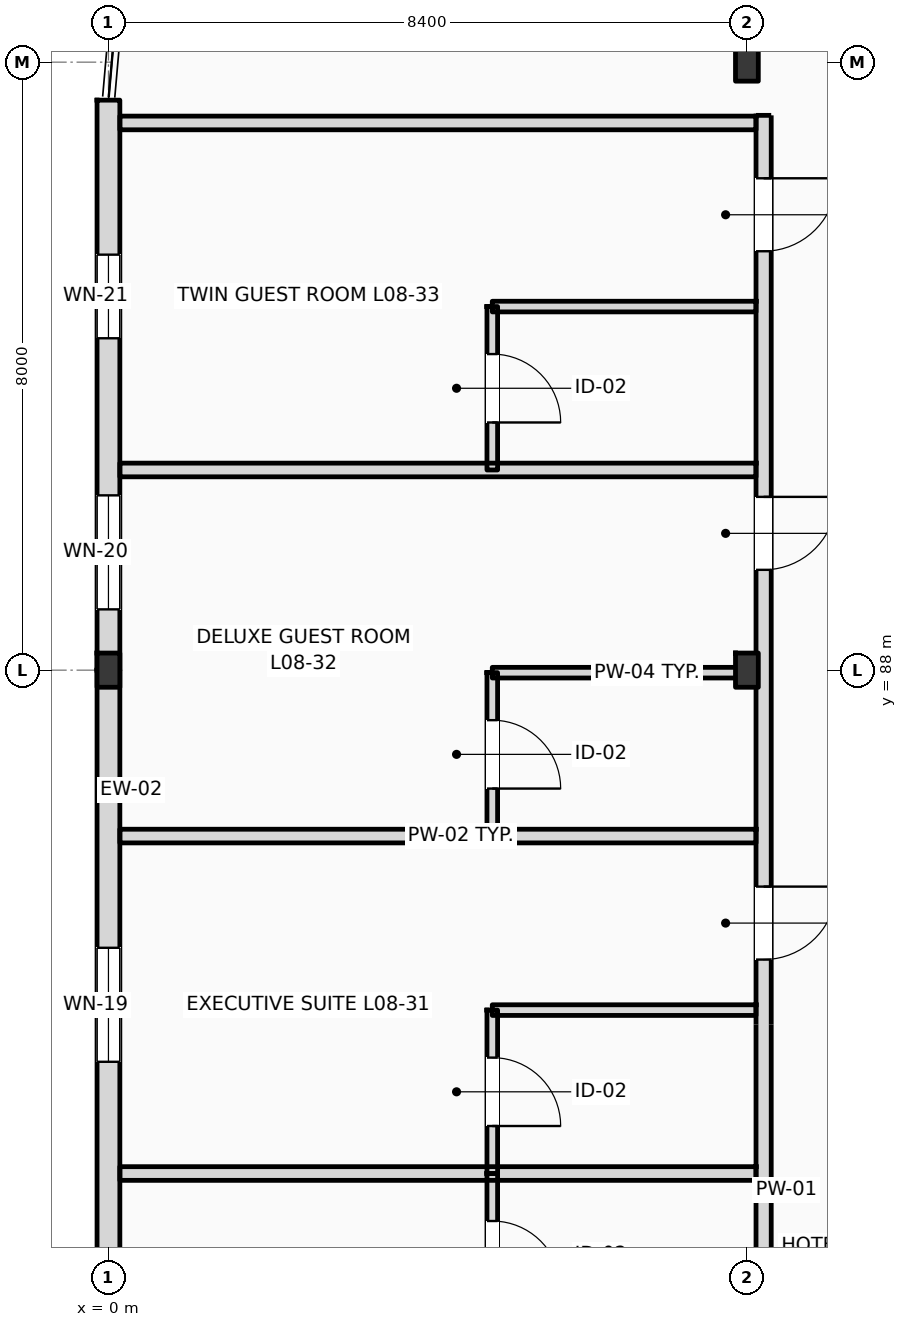
"""IFC4 building model, lengths in metres.
Left out: names, types, materials, properties, quantities, classifications, styles, units other than length and angle.
Written with IfcOpenShell. Run it as: python <this file> out.ifc"""

import sys

from ifc_helpers import new_model, si_unit, direction, frame, frame_2d, origin, origin_2d, place, context, subcontext, project, spatial, rectangle, i_section, extrude, element, fill, save


model = new_model("IFC4")
c1 = context("Model", 3, precision=1e-05, world=origin(), true_north=direction((0.0, 1.0)))
c2 = subcontext(c1, "Body", "Model", "MODEL_VIEW")
j1 = project(units=[si_unit("LENGTHUNIT", "METRE"), si_unit("PLANEANGLEUNIT", "RADIAN")], contexts=[c1])
p1 = place(None, origin())
s1 = spatial("IfcSite", under=j1, at=p1, CompositionType="ELEMENT")
p2 = place(p1, origin())
s2 = spatial("IfcBuilding", under=s1, at=p2, CompositionType="ELEMENT")
p3 = place(p2, frame((0.0, 0.0, 35.4)))
s3 = spatial("IfcBuildingStorey", under=s2, at=p3, CompositionType="ELEMENT", Elevation=35.4)
for number, where, z_axis, x_axis in (
    (1, (0.0, 88.0, 0.0), (0.0, 0.0, 1.0), (1.0, 0.0, 0.0)),
    (2, (8.4, 88.0, 0.0), (0.0, 0.0, 1.0), (1.0, 0.0, 0.0)),
):
    element("IfcColumn", number, at=place(p3, frame(where, z_axis=z_axis, x_axis=x_axis)), inside=s3, PredefinedType="COLUMN", context=c2, shape_type="SweptSolid", body=[
        extrude(i_section(OverallWidth=0.3, OverallDepth=0.45, WebThickness=0.014, FlangeThickness=0.026, FilletRadius=0.027, at=origin_2d()), origin(), (0.0, 0.0, 1.0), 3.6),
    ])
p4 = place(p3, frame((8.4, 96.0, 0.0), z_axis=(0.0, 0.0, 1.0), x_axis=(1.0, 0.0, 0.0)))
e3 = element("IfcColumn", 3, at=p4, inside=s3, PredefinedType="COLUMN", context=c2, shape_type="SweptSolid", body=[
    extrude(i_section(OverallWidth=0.3, OverallDepth=0.5, WebThickness=0.014, FlangeThickness=0.028, FilletRadius=0.027, at=origin_2d()), origin(), (0.0, 0.0, 1.0), 3.6),
])
p5 = place(p3, frame((0.0, 79.5, 0.0), z_axis=(0.0, 0.0, 1.0), x_axis=(0.0, 1.0, 0.0)))
e4 = element("IfcWall", 4, at=p5, inside=s3, PredefinedType="STANDARD", context=c2, shape_type="SweptSolid", body=[
    extrude(rectangle(XDim=8.5, YDim=0.3, at=frame_2d((4.25, 0.0))), origin(), (0.0, 0.0, 1.0), 3.01),
])
p6 = place(p5, frame((3.347, 0.0, 0.9)))
e5 = element("IfcOpeningElement", 5, at=p6, cuts=e4, PredefinedType="OPENING", context=c2, shape_type="SweptSolid", body=[
    extrude(rectangle(XDim=1.5, YDim=1.93, at=frame_2d((0.75, 0.965))), frame((0.0, 0.16, 0.0), z_axis=(0.0, -1.0, 0.0), x_axis=(1.0, 0.0, 0.0)), (0.0, 0.0, 1.0), 0.32),
])
p7 = place(p3, frame((0.0, 88.0, 0.0), z_axis=(0.0, 0.0, 1.0), x_axis=(0.0, 1.0, 0.0)))
e6 = element("IfcWall", 6, at=p7, inside=s3, PredefinedType="STANDARD", context=c2, shape_type="SweptSolid", body=[
    extrude(rectangle(XDim=7.5, YDim=0.3, at=frame_2d((3.75, 0.0))), origin(), (0.0, 0.0, 1.0), 3.38),
])
p8 = place(p7, frame((0.8, 0.0, 0.9)))
e7 = element("IfcOpeningElement", 7, at=p8, cuts=e6, PredefinedType="OPENING", context=c2, shape_type="SweptSolid", body=[
    extrude(rectangle(XDim=1.5, YDim=2.3, at=frame_2d((0.75, 1.15))), frame((0.0, 0.16, 0.0), z_axis=(0.0, -1.0, 0.0), x_axis=(1.0, 0.0, 0.0)), (0.0, 0.0, 1.0), 0.32),
])
p9 = place(p7, frame((4.367, 0.0, 0.9)))
e8 = element("IfcOpeningElement", 8, at=p9, cuts=e6, PredefinedType="OPENING", context=c2, shape_type="SweptSolid", body=[
    extrude(rectangle(XDim=1.1, YDim=1.5, at=frame_2d((0.55, 0.75))), frame((0.0, 0.16, 0.0), z_axis=(0.0, -1.0, 0.0), x_axis=(1.0, 0.0, 0.0)), (0.0, 0.0, 1.0), 0.32),
])
p10 = place(p3, frame((8.62, 62.64, 0.0), z_axis=(0.0, 0.0, 1.0), x_axis=(0.0, 1.0, 0.0)))
e9 = element("IfcWall", 9, at=p10, inside=s3, PredefinedType="PARTITIONING", context=c2, shape_type="SweptSolid", body=[
    extrude(rectangle(XDim=32.66, YDim=0.2, at=frame_2d((16.33, 0.0))), origin(), (0.0, 0.0, 1.0), 3.01),
])
p11 = place(p10, frame((3.006, 0.0, 0.0)))
e10 = element("IfcOpeningElement", 10, at=p11, cuts=e9, PredefinedType="OPENING", context=c2, shape_type="SweptSolid", body=[
    extrude(rectangle(XDim=0.96, YDim=2.2, at=frame_2d((0.48, 1.1))), frame((0.0, 0.11, 0.0), z_axis=(0.0, -1.0, 0.0), x_axis=(1.0, 0.0, 0.0)), (0.0, 0.0, 1.0), 0.22),
])
p12 = place(p10, frame((5.516, 0.0, 0.0)))
e11 = element("IfcOpeningElement", 11, at=p12, cuts=e9, PredefinedType="OPENING", context=c2, shape_type="SweptSolid", body=[
    extrude(rectangle(XDim=0.96, YDim=2.2, at=frame_2d((0.48, 1.1))), frame((0.0, 0.11, 0.0), z_axis=(0.0, -1.0, 0.0), x_axis=(1.0, 0.0, 0.0)), (0.0, 0.0, 1.0), 0.22),
])
p13 = place(p10, frame((12.295, 0.0, 0.0)))
e12 = element("IfcOpeningElement", 12, at=p13, cuts=e9, PredefinedType="OPENING", context=c2, shape_type="SweptSolid", body=[
    extrude(rectangle(XDim=0.96, YDim=2.2, at=frame_2d((0.48, 1.1))), frame((0.0, 0.11, 0.0), z_axis=(0.0, -1.0, 0.0), x_axis=(1.0, 0.0, 0.0)), (0.0, 0.0, 1.0), 0.22),
])
p14 = place(p10, frame((14.524, 0.0, 0.0)))
e13 = element("IfcOpeningElement", 13, at=p14, cuts=e9, PredefinedType="OPENING", context=c2, shape_type="SweptSolid", body=[
    extrude(rectangle(XDim=0.96, YDim=2.2, at=frame_2d((0.48, 1.1))), frame((0.0, 0.11, 0.0), z_axis=(0.0, -1.0, 0.0), x_axis=(1.0, 0.0, 0.0)), (0.0, 0.0, 1.0), 0.22),
])
p15 = place(p10, frame((21.552, 0.0, 0.0)))
e14 = element("IfcOpeningElement", 14, at=p15, cuts=e9, PredefinedType="OPENING", context=c2, shape_type="SweptSolid", body=[
    extrude(rectangle(XDim=0.96, YDim=2.2, at=frame_2d((0.48, 1.1))), frame((0.0, 0.11, 0.0), z_axis=(0.0, -1.0, 0.0), x_axis=(1.0, 0.0, 0.0)), (0.0, 0.0, 1.0), 0.22),
])
p16 = place(p10, frame((26.68, 0.0, 0.0)))
e15 = element("IfcOpeningElement", 15, at=p16, cuts=e9, PredefinedType="OPENING", context=c2, shape_type="SweptSolid", body=[
    extrude(rectangle(XDim=0.96, YDim=2.2, at=frame_2d((0.48, 1.1))), frame((0.0, 0.11, 0.0), z_axis=(0.0, -1.0, 0.0), x_axis=(1.0, 0.0, 0.0)), (0.0, 0.0, 1.0), 0.22),
])
p17 = place(p10, frame((30.872, 0.0, 0.0)))
e16 = element("IfcOpeningElement", 16, at=p17, cuts=e9, PredefinedType="OPENING", context=c2, shape_type="SweptSolid", body=[
    extrude(rectangle(XDim=0.96, YDim=2.2, at=frame_2d((0.48, 1.1))), frame((0.0, 0.11, 0.0), z_axis=(0.0, -1.0, 0.0), x_axis=(1.0, 0.0, 0.0)), (0.0, 0.0, 1.0), 0.22),
])
p18 = place(p3, frame((0.15, 81.377, 0.0), z_axis=(0.0, 0.0, 1.0), x_axis=(1.0, 0.0, 0.0)))
e17 = element("IfcWall", 17, at=p18, inside=s3, PredefinedType="PARTITIONING", context=c2, shape_type="SweptSolid", body=[
    extrude(rectangle(XDim=8.37, YDim=0.18, at=frame_2d((4.185, 0.0))), origin(), (0.0, 0.0, 1.0), 3.38),
])
p19 = place(p3, frame((5.05, 79.227, 0.0), z_axis=(0.0, 0.0, 1.0), x_axis=(0.0, 1.0, 0.0)))
e18 = element("IfcWall", 18, at=p19, inside=s3, PredefinedType="PARTITIONING", context=c2, shape_type="SweptSolid", body=[
    extrude(rectangle(XDim=2.15, YDim=0.14, at=frame_2d((1.075, 0.0))), origin(), (0.0, 0.0, 1.0), 3.38),
])
p20 = place(p19, frame((0.625, 0.0, 0.0)))
e19 = element("IfcOpeningElement", 19, at=p20, cuts=e18, PredefinedType="OPENING", context=c2, shape_type="SweptSolid", body=[
    extrude(rectangle(XDim=0.9, YDim=2.1, at=frame_2d((0.45, 1.05))), frame((0.0, 0.08, 0.0), z_axis=(0.0, -1.0, 0.0), x_axis=(1.0, 0.0, 0.0)), (0.0, 0.0, 1.0), 0.16),
])
p21 = place(p3, frame((0.15, 85.817, 0.0), z_axis=(0.0, 0.0, 1.0), x_axis=(1.0, 0.0, 0.0)))
e20 = element("IfcWall", 20, at=p21, inside=s3, PredefinedType="PARTITIONING", context=c2, shape_type="SweptSolid", body=[
    extrude(rectangle(XDim=8.37, YDim=0.18, at=frame_2d((4.185, 0.0))), origin(), (0.0, 0.0, 1.0), 3.38),
])
p22 = place(p3, frame((5.05, 83.527, 0.0), z_axis=(0.0, 0.0, 1.0), x_axis=(1.0, 0.0, 0.0)))
e21 = element("IfcWall", 21, at=p22, inside=s3, PredefinedType="PARTITIONING", context=c2, shape_type="SweptSolid", body=[
    extrude(rectangle(XDim=3.47, YDim=0.14, at=frame_2d((1.735, 0.0))), origin(), (0.0, 0.0, 1.0), 3.38),
])
p23 = place(p3, frame((5.05, 81.377, 0.0), z_axis=(0.0, 0.0, 1.0), x_axis=(0.0, 1.0, 0.0)))
e22 = element("IfcWall", 22, at=p23, inside=s3, PredefinedType="PARTITIONING", context=c2, shape_type="SweptSolid", body=[
    extrude(rectangle(XDim=2.15, YDim=0.14, at=frame_2d((1.075, 0.0))), origin(), (0.0, 0.0, 1.0), 3.38),
])
p24 = place(p23, frame((0.625, 0.0, 0.0)))
e23 = element("IfcOpeningElement", 23, at=p24, cuts=e22, PredefinedType="OPENING", context=c2, shape_type="SweptSolid", body=[
    extrude(rectangle(XDim=0.9, YDim=2.1, at=frame_2d((0.45, 1.05))), frame((0.0, 0.08, 0.0), z_axis=(0.0, -1.0, 0.0), x_axis=(1.0, 0.0, 0.0)), (0.0, 0.0, 1.0), 0.16),
])
p25 = place(p3, frame((0.15, 90.634, 0.0), z_axis=(0.0, 0.0, 1.0), x_axis=(1.0, 0.0, 0.0)))
e24 = element("IfcWall", 24, at=p25, inside=s3, PredefinedType="PARTITIONING", context=c2, shape_type="SweptSolid", body=[
    extrude(rectangle(XDim=8.37, YDim=0.18, at=frame_2d((4.185, 0.0))), origin(), (0.0, 0.0, 1.0), 3.38),
])
p26 = place(p3, frame((5.05, 87.967, 0.0), z_axis=(0.0, 0.0, 1.0), x_axis=(1.0, 0.0, 0.0)))
e25 = element("IfcWall", 25, at=p26, inside=s3, PredefinedType="PARTITIONING", context=c2, shape_type="SweptSolid", body=[
    extrude(rectangle(XDim=3.47, YDim=0.14, at=frame_2d((1.735, 0.0))), origin(), (0.0, 0.0, 1.0), 2.82),
])
p27 = place(p3, frame((5.05, 85.817, 0.0), z_axis=(0.0, 0.0, 1.0), x_axis=(0.0, 1.0, 0.0)))
e26 = element("IfcWall", 26, at=p27, inside=s3, PredefinedType="PARTITIONING", context=c2, shape_type="SweptSolid", body=[
    extrude(rectangle(XDim=2.15, YDim=0.14, at=frame_2d((1.075, 0.0))), origin(), (0.0, 0.0, 1.0), 3.38),
])
p28 = place(p27, frame((0.625, 0.0, 0.0)))
e27 = element("IfcOpeningElement", 27, at=p28, cuts=e26, PredefinedType="OPENING", context=c2, shape_type="SweptSolid", body=[
    extrude(rectangle(XDim=0.9, YDim=2.1, at=frame_2d((0.45, 1.05))), frame((0.0, 0.08, 0.0), z_axis=(0.0, -1.0, 0.0), x_axis=(1.0, 0.0, 0.0)), (0.0, 0.0, 1.0), 0.16),
])
p29 = place(p3, frame((0.15, 95.2, 0.0), z_axis=(0.0, 0.0, 1.0), x_axis=(1.0, 0.0, 0.0)))
e28 = element("IfcWall", 28, at=p29, inside=s3, PredefinedType="PARTITIONING", context=c2, shape_type="SweptSolid", body=[
    extrude(rectangle(XDim=8.37, YDim=0.18, at=frame_2d((4.185, 0.0))), origin(), (0.0, 0.0, 1.0), 3.38),
])
p30 = place(p3, frame((5.05, 92.784, 0.0), z_axis=(0.0, 0.0, 1.0), x_axis=(1.0, 0.0, 0.0)))
e29 = element("IfcWall", 29, at=p30, inside=s3, PredefinedType="PARTITIONING", context=c2, shape_type="SweptSolid", body=[
    extrude(rectangle(XDim=3.47, YDim=0.14, at=frame_2d((1.735, 0.0))), origin(), (0.0, 0.0, 1.0), 3.38),
])
p31 = place(p3, frame((5.05, 90.634, 0.0), z_axis=(0.0, 0.0, 1.0), x_axis=(0.0, 1.0, 0.0)))
e30 = element("IfcWall", 30, at=p31, inside=s3, PredefinedType="PARTITIONING", context=c2, shape_type="SweptSolid", body=[
    extrude(rectangle(XDim=2.15, YDim=0.14, at=frame_2d((1.075, 0.0))), origin(), (0.0, 0.0, 1.0), 3.38),
])
p32 = place(p31, frame((0.625, 0.0, 0.0)))
e31 = element("IfcOpeningElement", 31, at=p32, cuts=e30, PredefinedType="OPENING", context=c2, shape_type="SweptSolid", body=[
    extrude(rectangle(XDim=0.9, YDim=2.1, at=frame_2d((0.45, 1.05))), frame((0.0, 0.08, 0.0), z_axis=(0.0, -1.0, 0.0), x_axis=(1.0, 0.0, 0.0)), (0.0, 0.0, 1.0), 0.16),
])
p33 = place(p6, origin())
e32 = element("IfcWindow", 32, at=p33, inside=s3, PartitioningType="DOUBLE_PANEL_VERTICAL", PredefinedType="WINDOW", context=c2, shape_type="SweptSolid", body=[
    extrude(rectangle(XDim=1.5, YDim=1.93, at=frame_2d((0.75, 0.965))), frame((0.0, 0.03, 0.0), z_axis=(0.0, -1.0, 0.0), x_axis=(1.0, 0.0, 0.0)), (0.0, 0.0, 1.0), 0.06),
])
fill(e5, e32)
p34 = place(p8, origin())
e33 = element("IfcWindow", 33, at=p34, inside=s3, PartitioningType="DOUBLE_PANEL_VERTICAL", PredefinedType="WINDOW", context=c2, shape_type="SweptSolid", body=[
    extrude(rectangle(XDim=1.5, YDim=2.3, at=frame_2d((0.75, 1.15))), frame((0.0, 0.03, 0.0), z_axis=(0.0, -1.0, 0.0), x_axis=(1.0, 0.0, 0.0)), (0.0, 0.0, 1.0), 0.06),
])
fill(e7, e33)
p35 = place(p9, origin())
e34 = element("IfcWindow", 34, at=p35, inside=s3, PartitioningType="DOUBLE_PANEL_VERTICAL", PredefinedType="WINDOW", context=c2, shape_type="SweptSolid", body=[
    extrude(rectangle(XDim=1.1, YDim=1.5, at=frame_2d((0.55, 0.75))), frame((0.0, 0.03, 0.0), z_axis=(0.0, -1.0, 0.0), x_axis=(1.0, 0.0, 0.0)), (0.0, 0.0, 1.0), 0.06),
])
fill(e8, e34)
p36 = place(p20, frame((0.9, 0.0, 0.0), z_axis=(0.0, 0.0, 1.0), x_axis=(-1.0, 0.0, 0.0)))
e35 = element("IfcDoor", 35, at=p36, inside=s3, OperationType="SINGLE_SWING_LEFT", PredefinedType="DOOR", context=c2, shape_type="SweptSolid", body=[
    extrude(rectangle(XDim=0.9, YDim=2.1, at=frame_2d((0.45, 1.05))), frame((0.0, 0.025, 0.0), z_axis=(0.0, -1.0, 0.0), x_axis=(1.0, 0.0, 0.0)), (0.0, 0.0, 1.0), 0.05),
])
fill(e19, e35)
p37 = place(p15, frame((0.96, 0.0, 0.0), z_axis=(0.0, 0.0, 1.0), x_axis=(-1.0, 0.0, 0.0)))
e36 = element("IfcDoor", 36, at=p37, inside=s3, OperationType="SINGLE_SWING_RIGHT", PredefinedType="DOOR", context=c2, shape_type="SweptSolid", body=[
    extrude(rectangle(XDim=0.96, YDim=2.2, at=frame_2d((0.48, 1.1))), frame((0.0, 0.025, 0.0), z_axis=(0.0, -1.0, 0.0), x_axis=(1.0, 0.0, 0.0)), (0.0, 0.0, 1.0), 0.05),
])
fill(e14, e36)
p38 = place(p24, frame((0.9, 0.0, 0.0), z_axis=(0.0, 0.0, 1.0), x_axis=(-1.0, 0.0, 0.0)))
e37 = element("IfcDoor", 37, at=p38, inside=s3, OperationType="SINGLE_SWING_LEFT", PredefinedType="DOOR", context=c2, shape_type="SweptSolid", body=[
    extrude(rectangle(XDim=0.9, YDim=2.1, at=frame_2d((0.45, 1.05))), frame((0.0, 0.025, 0.0), z_axis=(0.0, -1.0, 0.0), x_axis=(1.0, 0.0, 0.0)), (0.0, 0.0, 1.0), 0.05),
])
fill(e23, e37)
p39 = place(p16, frame((0.96, 0.0, 0.0), z_axis=(0.0, 0.0, 1.0), x_axis=(-1.0, 0.0, 0.0)))
e38 = element("IfcDoor", 38, at=p39, inside=s3, OperationType="SINGLE_SWING_RIGHT", PredefinedType="DOOR", context=c2, shape_type="SweptSolid", body=[
    extrude(rectangle(XDim=0.96, YDim=2.2, at=frame_2d((0.48, 1.1))), frame((0.0, 0.025, 0.0), z_axis=(0.0, -1.0, 0.0), x_axis=(1.0, 0.0, 0.0)), (0.0, 0.0, 1.0), 0.05),
])
fill(e15, e38)
p40 = place(p28, frame((0.9, 0.0, 0.0), z_axis=(0.0, 0.0, 1.0), x_axis=(-1.0, 0.0, 0.0)))
e39 = element("IfcDoor", 39, at=p40, inside=s3, OperationType="SINGLE_SWING_LEFT", PredefinedType="DOOR", context=c2, shape_type="SweptSolid", body=[
    extrude(rectangle(XDim=0.9, YDim=2.1, at=frame_2d((0.45, 1.05))), frame((0.0, 0.025, 0.0), z_axis=(0.0, -1.0, 0.0), x_axis=(1.0, 0.0, 0.0)), (0.0, 0.0, 1.0), 0.05),
])
fill(e27, e39)
p41 = place(p17, frame((0.96, 0.0, 0.0), z_axis=(0.0, 0.0, 1.0), x_axis=(-1.0, 0.0, 0.0)))
e40 = element("IfcDoor", 40, at=p41, inside=s3, OperationType="SINGLE_SWING_RIGHT", PredefinedType="DOOR", context=c2, shape_type="SweptSolid", body=[
    extrude(rectangle(XDim=0.96, YDim=2.2, at=frame_2d((0.48, 1.1))), frame((0.0, 0.025, 0.0), z_axis=(0.0, -1.0, 0.0), x_axis=(1.0, 0.0, 0.0)), (0.0, 0.0, 1.0), 0.05),
])
fill(e16, e40)
p42 = place(p32, frame((0.9, 0.0, 0.0), z_axis=(0.0, 0.0, 1.0), x_axis=(-1.0, 0.0, 0.0)))
e41 = element("IfcDoor", 41, at=p42, inside=s3, OperationType="SINGLE_SWING_LEFT", PredefinedType="DOOR", context=c2, shape_type="SweptSolid", body=[
    extrude(rectangle(XDim=0.9, YDim=2.1, at=frame_2d((0.45, 1.05))), frame((0.0, 0.025, 0.0), z_axis=(0.0, -1.0, 0.0), x_axis=(1.0, 0.0, 0.0)), (0.0, 0.0, 1.0), 0.05),
])
fill(e31, e41)
save(model, sys.argv[1])
